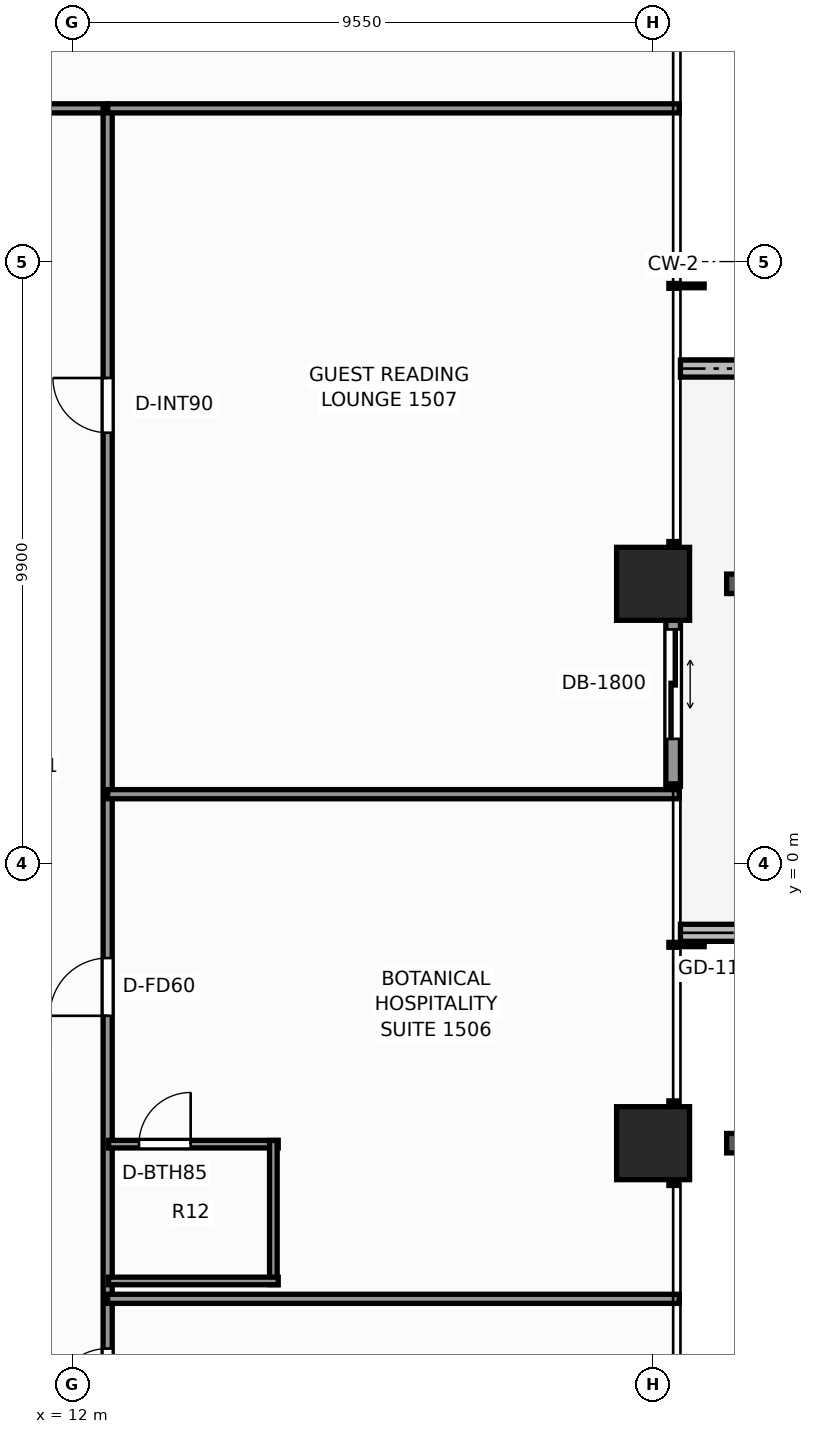
"""IFC4 building model, lengths in metres.
Left out: names, types, materials, properties, quantities, classifications, styles, units other than length and angle.
Written with IfcOpenShell. Run it as: python <this file> out.ifc"""

import sys

from ifc_helpers import new_model, si_unit, direction, frame, frame_2d, origin, origin_2d, place, context, subcontext, project, spatial, rectangle, extrude, element, fill, save


model = new_model("IFC4")
c1 = context("Model", 3, precision=1e-05, world=origin(), true_north=direction((0.0, 1.0)))
c2 = subcontext(c1, "Body", "Model", "MODEL_VIEW")
j1 = project(units=[si_unit("LENGTHUNIT", "METRE"), si_unit("PLANEANGLEUNIT", "RADIAN")], contexts=[c1])
p1 = place(None, origin())
s1 = spatial("IfcSite", under=j1, at=p1, CompositionType="ELEMENT")
p2 = place(p1, origin())
s2 = spatial("IfcBuilding", under=s1, at=p2, CompositionType="ELEMENT")
p3 = place(p2, frame((0.0, 0.0, 53.5)))
s3 = spatial("IfcBuildingStorey", under=s2, at=p3, CompositionType="ELEMENT", Elevation=53.5)
for number, where, z_axis, x_axis in (
    (1, (21.55, -4.6, 0.0), (0.0, 0.0, 1.0), (1.0, 0.0, 0.0)),
    (2, (21.55, 4.6, 0.0), (0.0, 0.0, 1.0), (1.0, 0.0, 0.0)),
):
    element("IfcColumn", number, at=place(p3, frame(where, z_axis=z_axis, x_axis=x_axis)), inside=s3, PredefinedType="COLUMN", context=c2, shape_type="SweptSolid", body=[
        extrude(rectangle(XDim=1.2, YDim=1.2, at=origin_2d()), origin(), (0.0, 0.0, 1.0), 3.3),
    ])
for number, where, z_axis, x_axis in (
    (3, (22.0, -1.14, -0.06), (0.0, 0.0, 1.0), (1.0, 0.0, 0.0)),
    (4, (25.3, 8.14, -0.06), (0.0, 0.0, 1.0), (-1.0, 0.0, 0.0)),
):
    element("IfcWall", number, at=place(p3, frame(where, z_axis=z_axis, x_axis=x_axis)), inside=s3, PredefinedType="PARAPET", context=c2, shape_type="SweptSolid", body=[
        extrude(rectangle(XDim=3.3, YDim=0.28, at=frame_2d((1.65, 0.0))), origin(), (0.0, 0.0, 1.0), 0.42),
    ])
p4 = place(p3, frame((21.88, 4.63, 0.0), z_axis=(0.0, 0.0, 1.0), x_axis=(0.0, -1.0, 0.0)))
e5 = element("IfcWall", 5, at=p4, inside=s3, PredefinedType="STANDARD", context=c2, shape_type="SweptSolid", body=[
    extrude(rectangle(XDim=3.36, YDim=0.24, at=frame_2d((1.68, 0.0))), origin(), (0.0, 0.0, 1.0), 3.06),
])
p5 = place(p4, frame((0.78, 0.0, 0.0)))
e6 = element("IfcOpeningElement", 6, at=p5, cuts=e5, PredefinedType="OPENING", context=c2, shape_type="SweptSolid", body=[
    extrude(rectangle(XDim=1.8, YDim=2.2, at=frame_2d((0.9, 1.1))), frame((0.0, 0.13, 0.0), z_axis=(0.0, -1.0, 0.0), x_axis=(1.0, 0.0, 0.0)), (0.0, 0.0, 1.0), 0.26),
])
p6 = place(p3, frame((-12.26, 12.42, 0.0), z_axis=(0.0, 0.0, 1.0), x_axis=(1.0, 0.0, 0.0)))
e7 = element("IfcWall", 7, at=p6, inside=s3, PredefinedType="PARTITIONING", context=c2, shape_type="SweptSolid", body=[
    extrude(rectangle(XDim=24.84, YDim=0.15, at=frame_2d((12.42, 0.0))), origin(), (0.0, 0.0, 1.0), 2.272),
])
p7 = place(p6, frame((3.979, 0.0, 0.0)))
e8 = element("IfcOpeningElement", 8, at=p7, cuts=e7, PredefinedType="OPENING", context=c2, shape_type="SweptSolid", body=[
    extrude(rectangle(XDim=0.9, YDim=2.06, at=frame_2d((0.45, 1.03))), frame((0.0, 0.085, 0.0), z_axis=(0.0, -1.0, 0.0), x_axis=(1.0, 0.0, 0.0)), (0.0, 0.0, 1.0), 0.17),
])
p8 = place(p6, frame((9.78, 0.0, 0.0)))
e9 = element("IfcOpeningElement", 9, at=p8, cuts=e7, PredefinedType="OPENING", context=c2, shape_type="SweptSolid", body=[
    extrude(rectangle(XDim=0.9, YDim=2.06, at=frame_2d((0.45, 1.03))), frame((0.0, 0.085, 0.0), z_axis=(0.0, -1.0, 0.0), x_axis=(1.0, 0.0, 0.0)), (0.0, 0.0, 1.0), 0.17),
])
p9 = place(p6, frame((19.345, 0.0, 0.0)))
e10 = element("IfcOpeningElement", 10, at=p9, cuts=e7, PredefinedType="OPENING", context=c2, shape_type="SweptSolid", body=[
    extrude(rectangle(XDim=0.9, YDim=2.06, at=frame_2d((0.45, 1.03))), frame((0.0, 0.085, 0.0), z_axis=(0.0, -1.0, 0.0), x_axis=(1.0, 0.0, 0.0)), (0.0, 0.0, 1.0), 0.17),
])
p10 = place(p3, frame((12.58, -12.42, 0.0), z_axis=(0.0, 0.0, 1.0), x_axis=(0.0, 1.0, 0.0)))
e11 = element("IfcWall", 11, at=p10, inside=s3, PredefinedType="PARTITIONING", context=c2, shape_type="SweptSolid", body=[
    extrude(rectangle(XDim=24.84, YDim=0.15, at=frame_2d((12.42, 0.0))), origin(), (0.0, 0.0, 1.0), 2.272),
])
p11 = place(p10, frame((3.542, 0.0, 0.0)))
e12 = element("IfcOpeningElement", 12, at=p11, cuts=e11, PredefinedType="OPENING", context=c2, shape_type="SweptSolid", body=[
    extrude(rectangle(XDim=0.9, YDim=2.06, at=frame_2d((0.45, 1.03))), frame((0.0, 0.085, 0.0), z_axis=(0.0, -1.0, 0.0), x_axis=(1.0, 0.0, 0.0)), (0.0, 0.0, 1.0), 0.17),
])
p12 = place(p10, frame((9.915, 0.0, 0.0)))
e13 = element("IfcOpeningElement", 13, at=p12, cuts=e11, PredefinedType="OPENING", context=c2, shape_type="SweptSolid", body=[
    extrude(rectangle(XDim=0.95, YDim=2.06, at=frame_2d((0.475, 1.03))), frame((0.0, 0.085, 0.0), z_axis=(0.0, -1.0, 0.0), x_axis=(1.0, 0.0, 0.0)), (0.0, 0.0, 1.0), 0.17),
])
p13 = place(p10, frame((19.505, 0.0, 0.0)))
e14 = element("IfcOpeningElement", 14, at=p13, cuts=e11, PredefinedType="OPENING", context=c2, shape_type="SweptSolid", body=[
    extrude(rectangle(XDim=0.9, YDim=2.06, at=frame_2d((0.45, 1.03))), frame((0.0, 0.085, 0.0), z_axis=(0.0, -1.0, 0.0), x_axis=(1.0, 0.0, 0.0)), (0.0, 0.0, 1.0), 0.17),
])
p14 = place(p3, frame((12.58, 12.42, 0.0), z_axis=(0.0, 0.0, 1.0), x_axis=(1.0, 0.0, 0.0)))
e15 = element("IfcWall", 15, at=p14, inside=s3, PredefinedType="PARTITIONING", context=c2, shape_type="SweptSolid", body=[
    extrude(rectangle(XDim=9.4, YDim=0.15, at=frame_2d((4.7, 0.0))), origin(), (0.0, 0.0, 1.0), 2.272),
])
for number, where, z_axis, x_axis in (
    (16, (12.58, -7.16, 0.0), (0.0, 0.0, 1.0), (1.0, 0.0, 0.0)),
    (17, (12.58, 1.14, 0.0), (0.0, 0.0, 1.0), (1.0, 0.0, 0.0)),
):
    element("IfcWall", number, at=place(p3, frame(where, z_axis=z_axis, x_axis=x_axis)), inside=s3, PredefinedType="PARTITIONING", context=c2, shape_type="SweptSolid", body=[
        extrude(rectangle(XDim=9.4, YDim=0.15, at=frame_2d((4.7, 0.0))), origin(), (0.0, 0.0, 1.0), 2.429),
    ])
p15 = place(p3, frame((12.595, -4.616, 0.0), z_axis=(0.0, 0.0, 1.0), x_axis=(1.0, 0.0, 0.0)))
e18 = element("IfcWall", 18, at=p15, inside=s3, PredefinedType="PARTITIONING", context=c2, shape_type="SweptSolid", body=[
    extrude(rectangle(XDim=2.79, YDim=0.125, at=frame_2d((1.395, 0.0))), origin(), (0.0, 0.0, 1.0), 2.272),
])
p16 = place(p15, frame((0.5, 0.0, 0.0)))
e19 = element("IfcOpeningElement", 19, at=p16, cuts=e18, PredefinedType="OPENING", context=c2, shape_type="SweptSolid", body=[
    extrude(rectangle(XDim=0.85, YDim=2.03, at=frame_2d((0.425, 1.015))), frame((0.0, 0.073, 0.0), z_axis=(0.0, -1.0, 0.0), x_axis=(1.0, 0.0, 0.0)), (0.0, 0.0, 1.0), 0.145),
])
p17 = place(p3, frame((15.305, -6.926, 0.0), z_axis=(0.0, 0.0, 1.0), x_axis=(0.0, 1.0, 0.0)))
e20 = element("IfcWall", 20, at=p17, inside=s3, PredefinedType="PARTITIONING", context=c2, shape_type="SweptSolid", body=[
    extrude(rectangle(XDim=2.37, YDim=0.125, at=frame_2d((1.185, 0.0))), origin(), (0.0, 0.0, 1.0), 2.272),
])
p18 = place(p3, frame((12.595, -6.866, 0.0), z_axis=(0.0, 0.0, 1.0), x_axis=(1.0, 0.0, 0.0)))
e21 = element("IfcWall", 21, at=p18, inside=s3, PredefinedType="PARTITIONING", context=c2, shape_type="SweptSolid", body=[
    extrude(rectangle(XDim=2.79, YDim=0.125, at=frame_2d((1.395, 0.0))), origin(), (0.0, 0.0, 1.0), 3.06),
])
p19 = place(p5, origin())
e22 = element("IfcDoor", 22, at=p19, inside=s3, OperationType="DOUBLE_DOOR_SLIDING", PredefinedType="DOOR", context=c2, shape_type="SweptSolid", body=[
    extrude(rectangle(XDim=1.8, YDim=2.2, at=frame_2d((0.9, 1.1))), frame((0.0, 0.025, 0.0), z_axis=(0.0, -1.0, 0.0), x_axis=(1.0, 0.0, 0.0)), (0.0, 0.0, 1.0), 0.05),
])
fill(e6, e22)
p20 = place(p11, origin())
e23 = element("IfcDoor", 23, at=p20, inside=s3, OperationType="SINGLE_SWING_LEFT", PredefinedType="DOOR", context=c2, shape_type="SweptSolid", body=[
    extrude(rectangle(XDim=0.9, YDim=2.06, at=frame_2d((0.45, 1.03))), frame((0.0, 0.025, 0.0), z_axis=(0.0, -1.0, 0.0), x_axis=(1.0, 0.0, 0.0)), (0.0, 0.0, 1.0), 0.05),
])
fill(e12, e23)
p21 = place(p16, origin())
e24 = element("IfcDoor", 24, at=p21, inside=s3, OperationType="SINGLE_SWING_RIGHT", PredefinedType="DOOR", context=c2, shape_type="SweptSolid", body=[
    extrude(rectangle(XDim=0.85, YDim=2.03, at=frame_2d((0.425, 1.015))), frame((0.0, 0.025, 0.0), z_axis=(0.0, -1.0, 0.0), x_axis=(1.0, 0.0, 0.0)), (0.0, 0.0, 1.0), 0.05),
])
fill(e19, e24)
p22 = place(p12, origin())
e25 = element("IfcDoor", 25, at=p22, inside=s3, OperationType="SINGLE_SWING_LEFT", PredefinedType="DOOR", context=c2, shape_type="SweptSolid", body=[
    extrude(rectangle(XDim=0.95, YDim=2.06, at=frame_2d((0.475, 1.03))), frame((0.0, 0.025, 0.0), z_axis=(0.0, -1.0, 0.0), x_axis=(1.0, 0.0, 0.0)), (0.0, 0.0, 1.0), 0.05),
])
fill(e13, e25)
p23 = place(p13, origin())
e26 = element("IfcDoor", 26, at=p23, inside=s3, OperationType="SINGLE_SWING_RIGHT", PredefinedType="DOOR", context=c2, shape_type="SweptSolid", body=[
    extrude(rectangle(XDim=0.9, YDim=2.06, at=frame_2d((0.45, 1.03))), frame((0.0, 0.025, 0.0), z_axis=(0.0, -1.0, 0.0), x_axis=(1.0, 0.0, 0.0)), (0.0, 0.0, 1.0), 0.05),
])
fill(e14, e26)
save(model, sys.argv[1])
